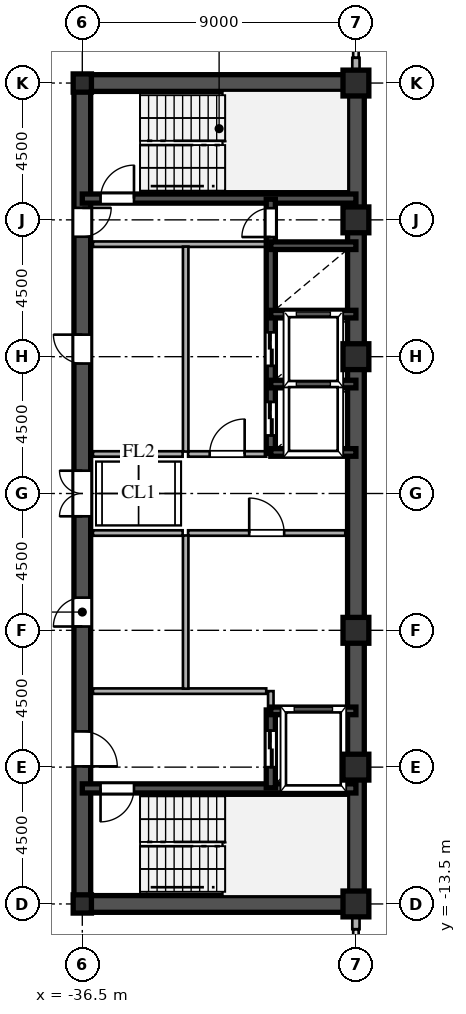
"""IFC4 building model, lengths in metres.
Left out: names, types, materials, properties, quantities, classifications, styles, units other than length and angle.
Written with IfcOpenShell. Run it as: python <this file> out.ifc"""

import sys

from ifc_helpers import new_model, si_unit, direction, frame, frame_2d, origin, origin_2d, place, context, subcontext, project, spatial, rectangle, hollow_rectangle, i_section, extrude, source, transform, mapped, element, fill, save


model = new_model("IFC4")
c1 = context("Model", 3, precision=1e-05, world=origin(), true_north=direction((0.0, 1.0)))
c2 = subcontext(c1, "Body", "Model", "MODEL_VIEW")
j1 = project(units=[si_unit("LENGTHUNIT", "METRE"), si_unit("PLANEANGLEUNIT", "RADIAN")], contexts=[c1])
p1 = place(None, origin())
s1 = spatial("IfcSite", under=j1, at=p1, CompositionType="ELEMENT")
p2 = place(p1, origin())
s2 = spatial("IfcBuilding", under=s1, at=p2, CompositionType="ELEMENT")
p3 = place(p2, frame((0.0, 0.0, 170.7)))
s3 = spatial("IfcBuildingStorey", under=s2, at=p3, CompositionType="ELEMENT", Elevation=170.7)
m1 = source(origin(), c2, "Body", "SweptSolid", [
    extrude(hollow_rectangle(XDim=0.85, YDim=0.85, WallThickness=0.036, at=origin_2d()), origin(), (0.0, 0.0, 1.0), 3.6),
])
for number, where, z_axis, x_axis in (
    (1, (-27.5, -13.5, 0.0), (0.0, 0.0, 1.0), (1.0, 0.0, 0.0)),
    (2, (-27.5, -9.0, 0.0), (0.0, 0.0, 1.0), (1.0, 0.0, 0.0)),
    (3, (-27.5, -4.5, 0.0), (0.0, 0.0, 1.0), (1.0, 0.0, 0.0)),
    (4, (-27.5, 4.5, 0.0), (0.0, 0.0, 1.0), (1.0, 0.0, 0.0)),
    (5, (-27.5, 9.0, 0.0), (0.0, 0.0, 1.0), (1.0, 0.0, 0.0)),
    (6, (-27.5, 13.5, 0.0), (0.0, 0.0, 1.0), (1.0, 0.0, 0.0)),
):
    element("IfcColumn", number, at=place(p3, frame(where, z_axis=z_axis, x_axis=x_axis)), inside=s3, PredefinedType="COLUMN", context=c2, shape_type="MappedRepresentation", body=[
        mapped(m1, transform((0.0, 0.0, 0.0), scale=1.0)),
    ])
m2 = source(origin(), c2, "Body", "SweptSolid", [
    extrude(i_section(OverallWidth=0.6, OverallDepth=0.6, WebThickness=0.025, FlangeThickness=0.04, at=origin_2d()), origin(), (0.0, 0.0, 1.0), 3.6),
])
for number, where, z_axis, x_axis in (
    (7, (-36.5, -13.5, 0.0), (0.0, 0.0, 1.0), (1.0, 0.0, 0.0)),
    (8, (-36.5, 13.5, 0.0), (0.0, 0.0, 1.0), (1.0, 0.0, 0.0)),
):
    element("IfcColumn", number, at=place(p3, frame(where, z_axis=z_axis, x_axis=x_axis)), inside=s3, PredefinedType="COLUMN", context=c2, shape_type="MappedRepresentation", body=[
        mapped(m2, transform((0.0, 0.0, 0.0), scale=1.0)),
    ])
for number, where, z_axis, x_axis in (
    (9, (-27.5, -14.33, 0.0), (0.0, 0.0, 1.0), (0.0, 1.0, 0.0)),
    (10, (-27.5, 13.78, 0.0), (0.0, 0.0, 1.0), (0.0, 1.0, 0.0)),
):
    element("IfcWall", number, at=place(p3, frame(where, z_axis=z_axis, x_axis=x_axis)), inside=s3, PredefinedType="SOLIDWALL", context=c2, shape_type="SweptSolid", body=[
        extrude(rectangle(XDim=0.55, YDim=0.24, at=frame_2d((0.275, 0.0))), origin(), (0.0, 0.0, 1.0), 2.88),
    ])
for number, where, z_axis, x_axis in (
    (11, (-27.5, -13.5, 0.0), (0.0, 0.0, 1.0), (0.0, 1.0, 0.0)),
    (12, (-27.5, 1.3, 0.0), (0.0, 0.0, 1.0), (0.0, 1.0, 0.0)),
):
    element("IfcWall", number, at=place(p3, frame(where, z_axis=z_axis, x_axis=x_axis)), inside=s3, PredefinedType="SHEAR", context=c2, shape_type="SweptSolid", body=[
        extrude(rectangle(XDim=12.2, YDim=0.55, at=frame_2d((6.1, 0.0))), origin(), (0.0, 0.0, 1.0), 3.38),
    ])
p4 = place(p3, frame((-27.5, -1.3, 0.0), z_axis=(0.0, 0.0, 1.0), x_axis=(0.0, 1.0, 0.0)))
e13 = element("IfcWall", 13, at=p4, inside=s3, PredefinedType="SHEAR", context=c2, shape_type="SweptSolid", body=[
    extrude(rectangle(XDim=2.6, YDim=0.55, at=frame_2d((1.3, 0.0))), origin(), (0.0, 0.0, 1.0), 3.38),
])
for number, where, z_axis, x_axis in (
    (14, (-36.5, -13.5, 0.0), (0.0, 0.0, 1.0), (1.0, 0.0, 0.0)),
    (15, (-36.5, 13.5, 0.0), (0.0, 0.0, 1.0), (1.0, 0.0, 0.0)),
):
    element("IfcWall", number, at=place(p3, frame(where, z_axis=z_axis, x_axis=x_axis)), inside=s3, PredefinedType="SHEAR", context=c2, shape_type="SweptSolid", body=[
        extrude(rectangle(XDim=9.0, YDim=0.55, at=frame_2d((4.5, 0.0))), origin(), (0.0, 0.0, 1.0), 3.38),
    ])
p5 = place(p3, frame((-36.5, -13.65, 0.0), z_axis=(0.0, 0.0, 1.0), x_axis=(0.0, 1.0, 0.0)))
e16 = element("IfcWall", 16, at=p5, inside=s3, PredefinedType="SHEAR", context=c2, shape_type="SweptSolid", body=[
    extrude(rectangle(XDim=7.15, YDim=0.55, at=frame_2d((3.575, 0.0))), origin(), (0.0, 0.0, 1.0), 3.38),
])
p6 = place(p5, frame((4.675, 0.0, 0.0)))
e17 = element("IfcOpeningElement", 17, at=p6, cuts=e16, PredefinedType="OPENING", context=c2, shape_type="SweptSolid", body=[
    extrude(rectangle(XDim=1.15, YDim=2.2, at=frame_2d((0.575, 1.1))), frame((0.0, 0.285, 0.0), z_axis=(0.0, -1.0, 0.0), x_axis=(1.0, 0.0, 0.0)), (0.0, 0.0, 1.0), 0.57),
])
p7 = place(p3, frame((-36.5, -1.3, 0.0), z_axis=(0.0, 0.0, 1.0), x_axis=(0.0, 1.0, 0.0)))
e18 = element("IfcWall", 18, at=p7, inside=s3, PredefinedType="SHEAR", context=c2, shape_type="SweptSolid", body=[
    extrude(rectangle(XDim=2.6, YDim=0.55, at=frame_2d((1.3, 0.0))), origin(), (0.0, 0.0, 1.0), 3.38),
])
p8 = place(p7, frame((0.55, 0.0, 0.0)))
e19 = element("IfcOpeningElement", 19, at=p8, cuts=e18, PredefinedType="OPENING", context=c2, shape_type="SweptSolid", body=[
    extrude(rectangle(XDim=1.5, YDim=2.3, at=frame_2d((0.75, 1.15))), frame((0.0, 0.285, 0.0), z_axis=(0.0, -1.0, 0.0), x_axis=(1.0, 0.0, 0.0)), (0.0, 0.0, 1.0), 0.57),
])
p9 = place(p3, frame((-36.5, 8.2, 0.0), z_axis=(0.0, 0.0, 1.0), x_axis=(0.0, 1.0, 0.0)))
e20 = element("IfcWall", 20, at=p9, inside=s3, PredefinedType="SHEAR", context=c2, shape_type="SweptSolid", body=[
    extrude(rectangle(XDim=5.45, YDim=0.55, at=frame_2d((2.725, 0.0))), origin(), (0.0, 0.0, 1.0), 3.38),
])
p10 = place(p9, frame((0.245, 0.0, 0.0)))
e21 = element("IfcOpeningElement", 21, at=p10, cuts=e20, PredefinedType="OPENING", context=c2, shape_type="SweptSolid", body=[
    extrude(rectangle(XDim=0.95, YDim=2.15, at=frame_2d((0.475, 1.075))), frame((0.0, 0.285, 0.0), z_axis=(0.0, -1.0, 0.0), x_axis=(1.0, 0.0, 0.0)), (0.0, 0.0, 1.0), 0.57),
])
p11 = place(p3, frame((-36.5, -6.5, 0.0), z_axis=(0.0, 0.0, 1.0), x_axis=(0.0, 1.0, 0.0)))
e22 = element("IfcWall", 22, at=p11, inside=s3, PredefinedType="SHEAR", context=c2, shape_type="SweptSolid", body=[
    extrude(rectangle(XDim=5.2, YDim=0.55, at=frame_2d((2.6, 0.0))), origin(), (0.0, 0.0, 1.0), 3.38),
])
p12 = place(p11, frame((2.125, 0.0, 0.0)))
e23 = element("IfcOpeningElement", 23, at=p12, cuts=e22, PredefinedType="OPENING", context=c2, shape_type="SweptSolid", body=[
    extrude(rectangle(XDim=0.95, YDim=2.15, at=frame_2d((0.475, 1.075))), frame((0.0, 0.285, 0.0), z_axis=(0.0, -1.0, 0.0), x_axis=(1.0, 0.0, 0.0)), (0.0, 0.0, 1.0), 0.57),
])
p13 = place(p3, frame((-36.5, 1.3, 0.0), z_axis=(0.0, 0.0, 1.0), x_axis=(0.0, 1.0, 0.0)))
e24 = element("IfcWall", 24, at=p13, inside=s3, PredefinedType="SHEAR", context=c2, shape_type="SweptSolid", body=[
    extrude(rectangle(XDim=6.9, YDim=0.55, at=frame_2d((3.45, 0.0))), origin(), (0.0, 0.0, 1.0), 3.38),
])
p14 = place(p13, frame((2.975, 0.0, 0.0)))
e25 = element("IfcOpeningElement", 25, at=p14, cuts=e24, PredefinedType="OPENING", context=c2, shape_type="SweptSolid", body=[
    extrude(rectangle(XDim=0.95, YDim=2.15, at=frame_2d((0.475, 1.075))), frame((0.0, 0.285, 0.0), z_axis=(0.0, -1.0, 0.0), x_axis=(1.0, 0.0, 0.0)), (0.0, 0.0, 1.0), 0.57),
])
p15 = place(p3, frame((-36.5, -9.7, 0.0), z_axis=(0.0, 0.0, 1.0), x_axis=(1.0, 0.0, 0.0)))
e26 = element("IfcWall", 26, at=p15, inside=s3, PredefinedType="SHEAR", context=c2, shape_type="SweptSolid", body=[
    extrude(rectangle(XDim=9.0, YDim=0.3, at=frame_2d((4.5, 0.0))), origin(), (0.0, 0.0, 1.0), 3.38),
])
p16 = place(p15, frame((0.6, 0.0, 0.0)))
e27 = element("IfcOpeningElement", 27, at=p16, cuts=e26, PredefinedType="OPENING", context=c2, shape_type="SweptSolid", body=[
    extrude(rectangle(XDim=1.1, YDim=2.2, at=frame_2d((0.55, 1.1))), frame((0.0, 0.16, 0.0), z_axis=(0.0, -1.0, 0.0), x_axis=(1.0, 0.0, 0.0)), (0.0, 0.0, 1.0), 0.32),
])
p17 = place(p3, frame((-36.5, 9.7, 0.0), z_axis=(0.0, 0.0, 1.0), x_axis=(1.0, 0.0, 0.0)))
e28 = element("IfcWall", 28, at=p17, inside=s3, PredefinedType="SHEAR", context=c2, shape_type="SweptSolid", body=[
    extrude(rectangle(XDim=9.0, YDim=0.3, at=frame_2d((4.5, 0.0))), origin(), (0.0, 0.0, 1.0), 3.38),
])
p18 = place(p17, frame((0.6, 0.0, 0.0)))
e29 = element("IfcOpeningElement", 29, at=p18, cuts=e28, PredefinedType="OPENING", context=c2, shape_type="SweptSolid", body=[
    extrude(rectangle(XDim=1.1, YDim=2.2, at=frame_2d((0.55, 1.1))), frame((0.0, 0.16, 0.0), z_axis=(0.0, -1.0, 0.0), x_axis=(1.0, 0.0, 0.0)), (0.0, 0.0, 1.0), 0.32),
])
for number, where, z_axis, x_axis in (
    (30, (-30.3, -7.15, 0.0), (0.0, 0.0, 1.0), (1.0, 0.0, 0.0)),
    (31, (-30.3, 1.35, 0.0), (0.0, 0.0, 1.0), (1.0, 0.0, 0.0)),
    (32, (-30.3, 3.6, 0.0), (0.0, 0.0, 1.0), (1.0, 0.0, 0.0)),
    (33, (-30.3, 5.9, 0.0), (0.0, 0.0, 1.0), (1.0, 0.0, 0.0)),
    (34, (-30.3, 8.15, 0.0), (0.0, 0.0, 1.0), (1.0, 0.0, 0.0)),
):
    element("IfcWall", number, at=place(p3, frame(where, z_axis=z_axis, x_axis=x_axis)), inside=s3, PredefinedType="SHEAR", context=c2, shape_type="SweptSolid", body=[
        extrude(rectangle(XDim=2.8, YDim=0.25, at=frame_2d((1.4, 0.0))), origin(), (0.0, 0.0, 1.0), 3.38),
    ])
p19 = place(p3, frame((-30.3, -9.68, 0.0), z_axis=(0.0, 0.0, 1.0), x_axis=(0.0, 1.0, 0.0)))
e35 = element("IfcWall", 35, at=p19, inside=s3, PredefinedType="SHEAR", context=c2, shape_type="SweptSolid", body=[
    extrude(rectangle(XDim=2.56, YDim=0.3, at=frame_2d((1.28, 0.0))), origin(), (0.0, 0.0, 1.0), 3.38),
])
p20 = place(p19, frame((0.68, 0.0, 0.0)))
e36 = element("IfcOpeningElement", 36, at=p20, cuts=e35, PredefinedType="OPENING", context=c2, shape_type="SweptSolid", body=[
    extrude(rectangle(XDim=1.2, YDim=2.25, at=frame_2d((0.6, 1.125))), frame((0.0, 0.16, 0.0), z_axis=(0.0, -1.0, 0.0), x_axis=(1.0, 0.0, 0.0)), (0.0, 0.0, 1.0), 0.32),
])
p21 = place(p3, frame((-30.3, 1.32, 0.0), z_axis=(0.0, 0.0, 1.0), x_axis=(0.0, 1.0, 0.0)))
e37 = element("IfcWall", 37, at=p21, inside=s3, PredefinedType="SHEAR", context=c2, shape_type="SweptSolid", body=[
    extrude(rectangle(XDim=2.28, YDim=0.3, at=frame_2d((1.14, 0.0))), origin(), (0.0, 0.0, 1.0), 3.38),
])
p22 = place(p21, frame((0.59, 0.0, 0.0)))
e38 = element("IfcOpeningElement", 38, at=p22, cuts=e37, PredefinedType="OPENING", context=c2, shape_type="SweptSolid", body=[
    extrude(rectangle(XDim=1.1, YDim=2.2, at=frame_2d((0.55, 1.1))), frame((0.0, 0.16, 0.0), z_axis=(0.0, -1.0, 0.0), x_axis=(1.0, 0.0, 0.0)), (0.0, 0.0, 1.0), 0.32),
])
p23 = place(p3, frame((-30.3, 3.6, 0.0), z_axis=(0.0, 0.0, 1.0), x_axis=(0.0, 1.0, 0.0)))
e39 = element("IfcWall", 39, at=p23, inside=s3, PredefinedType="SHEAR", context=c2, shape_type="SweptSolid", body=[
    extrude(rectangle(XDim=2.3, YDim=0.3, at=frame_2d((1.15, 0.0))), origin(), (0.0, 0.0, 1.0), 3.38),
])
p24 = place(p23, frame((0.6, 0.0, 0.0)))
e40 = element("IfcOpeningElement", 40, at=p24, cuts=e39, PredefinedType="OPENING", context=c2, shape_type="SweptSolid", body=[
    extrude(rectangle(XDim=1.1, YDim=2.2, at=frame_2d((0.55, 1.1))), frame((0.0, 0.16, 0.0), z_axis=(0.0, -1.0, 0.0), x_axis=(1.0, 0.0, 0.0)), (0.0, 0.0, 1.0), 0.32),
])
p25 = place(p3, frame((-30.3, 5.9, 0.0), z_axis=(0.0, 0.0, 1.0), x_axis=(0.0, 1.0, 0.0)))
e41 = element("IfcWall", 41, at=p25, inside=s3, PredefinedType="SHEAR", context=c2, shape_type="SweptSolid", body=[
    extrude(rectangle(XDim=2.25, YDim=0.3, at=frame_2d((1.125, 0.0))), origin(), (0.0, 0.0, 1.0), 3.38),
])
p26 = place(p3, frame((-30.3, 8.15, 0.0), z_axis=(0.0, 0.0, 1.0), x_axis=(0.0, 1.0, 0.0)))
e42 = element("IfcWall", 42, at=p26, inside=s3, PredefinedType="SHEAR", context=c2, shape_type="SweptSolid", body=[
    extrude(rectangle(XDim=1.53, YDim=0.3, at=frame_2d((0.765, 0.0))), origin(), (0.0, 0.0, 1.0), 3.38),
])
p27 = place(p26, frame((0.285, 0.0, 0.0)))
e43 = element("IfcOpeningElement", 43, at=p27, cuts=e42, PredefinedType="OPENING", context=c2, shape_type="SweptSolid", body=[
    extrude(rectangle(XDim=0.95, YDim=2.15, at=frame_2d((0.475, 1.075))), frame((0.0, 0.16, 0.0), z_axis=(0.0, -1.0, 0.0), x_axis=(1.0, 0.0, 0.0)), (0.0, 0.0, 1.0), 0.32),
])
p28 = place(p3, frame((-36.15, -6.5, 0.0), z_axis=(0.0, 0.0, 1.0), x_axis=(1.0, 0.0, 0.0)))
e44 = element("IfcWall", 44, at=p28, inside=s3, PredefinedType="PARTITIONING", context=c2, shape_type="SweptSolid", body=[
    extrude(rectangle(XDim=5.7, YDim=0.18, at=frame_2d((2.85, 0.0))), origin(), (0.0, 0.0, 1.0), 3.38),
])
p29 = place(p3, frame((-30.3, -7.12, 0.0), z_axis=(0.0, 0.0, 1.0), x_axis=(0.0, 1.0, 0.0)))
e45 = element("IfcWall", 45, at=p29, inside=s3, PredefinedType="PARTITIONING", context=c2, shape_type="SweptSolid", body=[
    extrude(rectangle(XDim=0.62, YDim=0.18, at=frame_2d((0.31, 0.0))), origin(), (0.0, 0.0, 1.0), 3.38),
])
p30 = place(p3, frame((-36.15, 8.2, 0.0), z_axis=(0.0, 0.0, 1.0), x_axis=(1.0, 0.0, 0.0)))
e46 = element("IfcWall", 46, at=p30, inside=s3, PredefinedType="PARTITIONING", context=c2, shape_type="SweptSolid", body=[
    extrude(rectangle(XDim=5.7, YDim=0.18, at=frame_2d((2.85, 0.0))), origin(), (0.0, 0.0, 1.0), 3.38),
])
p31 = place(p3, frame((-33.1, -6.42, 0.0), z_axis=(0.0, 0.0, 1.0), x_axis=(0.0, 1.0, 0.0)))
e47 = element("IfcWall", 47, at=p31, inside=s3, PredefinedType="PARTITIONING", context=c2, shape_type="SweptSolid", body=[
    extrude(rectangle(XDim=5.04, YDim=0.18, at=frame_2d((2.52, 0.0))), origin(), (0.0, 0.0, 1.0), 3.38),
])
p32 = place(p3, frame((-33.1, 1.38, 0.0), z_axis=(0.0, 0.0, 1.0), x_axis=(0.0, 1.0, 0.0)))
e48 = element("IfcWall", 48, at=p32, inside=s3, PredefinedType="PARTITIONING", context=c2, shape_type="SweptSolid", body=[
    extrude(rectangle(XDim=6.74, YDim=0.18, at=frame_2d((3.37, 0.0))), origin(), (0.0, 0.0, 1.0), 3.38),
])
p33 = place(p3, frame((-33.02, -1.3, 0.0), z_axis=(0.0, 0.0, 1.0), x_axis=(1.0, 0.0, 0.0)))
e49 = element("IfcWall", 49, at=p33, inside=s3, PredefinedType="PARTITIONING", context=c2, shape_type="SweptSolid", body=[
    extrude(rectangle(XDim=5.17, YDim=0.18, at=frame_2d((2.585, 0.0))), origin(), (0.0, 0.0, 1.0), 3.38),
])
p34 = place(p33, frame((2.01, 0.0, 0.0)))
e50 = element("IfcOpeningElement", 50, at=p34, cuts=e49, PredefinedType="OPENING", context=c2, shape_type="SweptSolid", body=[
    extrude(rectangle(XDim=1.15, YDim=2.2, at=frame_2d((0.575, 1.1))), frame((0.0, 0.1, 0.0), z_axis=(0.0, -1.0, 0.0), x_axis=(1.0, 0.0, 0.0)), (0.0, 0.0, 1.0), 0.2),
])
p35 = place(p3, frame((-33.02, 1.3, 0.0), z_axis=(0.0, 0.0, 1.0), x_axis=(1.0, 0.0, 0.0)))
e51 = element("IfcWall", 51, at=p35, inside=s3, PredefinedType="PARTITIONING", context=c2, shape_type="SweptSolid", body=[
    extrude(rectangle(XDim=2.57, YDim=0.18, at=frame_2d((1.285, 0.0))), origin(), (0.0, 0.0, 1.0), 3.38),
])
p36 = place(p35, frame((0.71, 0.0, 0.0)))
e52 = element("IfcOpeningElement", 52, at=p36, cuts=e51, PredefinedType="OPENING", context=c2, shape_type="SweptSolid", body=[
    extrude(rectangle(XDim=1.15, YDim=2.2, at=frame_2d((0.575, 1.1))), frame((0.0, 0.1, 0.0), z_axis=(0.0, -1.0, 0.0), x_axis=(1.0, 0.0, 0.0)), (0.0, 0.0, 1.0), 0.2),
])
for number, where, z_axis, x_axis in (
    (53, (-36.15, -1.3, 0.0), (0.0, 0.0, 1.0), (1.0, 0.0, 0.0)),
    (54, (-36.15, 1.3, 0.0), (0.0, 0.0, 1.0), (1.0, 0.0, 0.0)),
):
    element("IfcWall", number, at=place(p3, frame(where, z_axis=z_axis, x_axis=x_axis)), inside=s3, PredefinedType="PARTITIONING", context=c2, shape_type="SweptSolid", body=[
        extrude(rectangle(XDim=2.95, YDim=0.18, at=frame_2d((1.475, 0.0))), origin(), (0.0, 0.0, 1.0), 3.38),
    ])
m3 = source(origin(), c2, "Body", "SweptSolid", [
    extrude(rectangle(XDim=1.15, YDim=2.2, at=frame_2d((0.575, 1.1))), frame((0.0, 0.025, 0.0), z_axis=(0.0, -1.0, 0.0), x_axis=(1.0, 0.0, 0.0)), (0.0, 0.0, 1.0), 0.05),
])
p37 = place(p6, frame((1.15, 0.0, 0.0), z_axis=(0.0, 0.0, 1.0), x_axis=(-1.0, 0.0, 0.0)))
e55 = element("IfcDoor", 55, at=p37, inside=s3, OperationType="SINGLE_SWING_LEFT", PredefinedType="DOOR", context=c2, shape_type="MappedRepresentation", body=[
    mapped(m3, transform((0.0, 0.0, 0.0), scale=1.0)),
])
fill(e17, e55)
m4 = source(origin(), c2, "Body", "SweptSolid", [
    extrude(rectangle(XDim=1.5, YDim=2.3, at=frame_2d((0.75, 1.15))), frame((0.0, 0.025, 0.0), z_axis=(0.0, -1.0, 0.0), x_axis=(1.0, 0.0, 0.0)), (0.0, 0.0, 1.0), 0.05),
])
p38 = place(p8, origin())
e56 = element("IfcDoor", 56, at=p38, inside=s3, OperationType="DOUBLE_SWING_LEFT", PredefinedType="DOOR", context=c2, shape_type="MappedRepresentation", body=[
    mapped(m4, transform((0.0, 0.0, 0.0), scale=1.0)),
])
fill(e19, e56)
m5 = source(origin(), c2, "Body", "SweptSolid", [
    extrude(rectangle(XDim=0.95, YDim=2.15, at=frame_2d((0.475, 1.075))), frame((0.0, 0.025, 0.0), z_axis=(0.0, -1.0, 0.0), x_axis=(1.0, 0.0, 0.0)), (0.0, 0.0, 1.0), 0.05),
])
p39 = place(p10, frame((0.95, 0.0, 0.0), z_axis=(0.0, 0.0, 1.0), x_axis=(-1.0, 0.0, 0.0)))
e57 = element("IfcDoor", 57, at=p39, inside=s3, OperationType="SINGLE_SWING_RIGHT", PredefinedType="DOOR", context=c2, shape_type="MappedRepresentation", body=[
    mapped(m5, transform((0.0, 0.0, 0.0), scale=1.0)),
])
fill(e21, e57)
p40 = place(p12, origin())
e58 = element("IfcDoor", 58, at=p40, inside=s3, OperationType="SINGLE_SWING_LEFT", PredefinedType="DOOR", context=c2, shape_type="MappedRepresentation", body=[
    mapped(m5, transform((0.0, 0.0, 0.0), scale=1.0)),
])
fill(e23, e58)
p41 = place(p14, origin())
e59 = element("IfcDoor", 59, at=p41, inside=s3, OperationType="SINGLE_SWING_RIGHT", PredefinedType="DOOR", context=c2, shape_type="MappedRepresentation", body=[
    mapped(m5, transform((0.0, 0.0, 0.0), scale=1.0)),
])
fill(e25, e59)
m6 = source(origin(), c2, "Body", "SweptSolid", [
    extrude(rectangle(XDim=1.1, YDim=2.2, at=frame_2d((0.55, 1.1))), frame((0.0, 0.025, 0.0), z_axis=(0.0, -1.0, 0.0), x_axis=(1.0, 0.0, 0.0)), (0.0, 0.0, 1.0), 0.05),
])
p42 = place(p16, frame((1.1, 0.0, 0.0), z_axis=(0.0, 0.0, 1.0), x_axis=(-1.0, 0.0, 0.0)))
e60 = element("IfcDoor", 60, at=p42, inside=s3, OperationType="SINGLE_SWING_LEFT", PredefinedType="DOOR", context=c2, shape_type="MappedRepresentation", body=[
    mapped(m6, transform((0.0, 0.0, 0.0), scale=1.0)),
])
fill(e27, e60)
p43 = place(p18, origin())
e61 = element("IfcDoor", 61, at=p43, inside=s3, OperationType="SINGLE_SWING_RIGHT", PredefinedType="DOOR", context=c2, shape_type="MappedRepresentation", body=[
    mapped(m6, transform((0.0, 0.0, 0.0), scale=1.0)),
])
fill(e29, e61)
m7 = source(origin(), c2, "Body", "SweptSolid", [
    extrude(rectangle(XDim=1.2, YDim=2.25, at=frame_2d((0.6, 1.125))), frame((0.0, 0.025, 0.0), z_axis=(0.0, -1.0, 0.0), x_axis=(1.0, 0.0, 0.0)), (0.0, 0.0, 1.0), 0.05),
])
p44 = place(p20, origin())
e62 = element("IfcDoor", 62, at=p44, inside=s3, OperationType="DOUBLE_DOOR_SLIDING", PredefinedType="DOOR", context=c2, shape_type="MappedRepresentation", body=[
    mapped(m7, transform((0.0, 0.0, 0.0), scale=1.0)),
])
fill(e36, e62)
m8 = source(origin(), c2, "Body", "SweptSolid", [
    extrude(rectangle(XDim=1.1, YDim=2.2, at=frame_2d((0.55, 1.1))), frame((0.0, 0.025, 0.0), z_axis=(0.0, -1.0, 0.0), x_axis=(1.0, 0.0, 0.0)), (0.0, 0.0, 1.0), 0.05),
])
p45 = place(p22, origin())
e63 = element("IfcDoor", 63, at=p45, inside=s3, OperationType="DOUBLE_DOOR_SLIDING", PredefinedType="DOOR", context=c2, shape_type="MappedRepresentation", body=[
    mapped(m8, transform((0.0, 0.0, 0.0), scale=1.0)),
])
fill(e38, e63)
p46 = place(p24, origin())
e64 = element("IfcDoor", 64, at=p46, inside=s3, OperationType="DOUBLE_DOOR_SLIDING", PredefinedType="DOOR", context=c2, shape_type="MappedRepresentation", body=[
    mapped(m8, transform((0.0, 0.0, 0.0), scale=1.0)),
])
fill(e40, e64)
p47 = place(p27, origin())
e65 = element("IfcDoor", 65, at=p47, inside=s3, OperationType="SINGLE_SWING_LEFT", PredefinedType="DOOR", context=c2, shape_type="MappedRepresentation", body=[
    mapped(m5, transform((0.0, 0.0, 0.0), scale=1.0)),
])
fill(e43, e65)
p48 = place(p34, origin())
e66 = element("IfcDoor", 66, at=p48, inside=s3, OperationType="SINGLE_SWING_LEFT", PredefinedType="DOOR", context=c2, shape_type="MappedRepresentation", body=[
    mapped(m3, transform((0.0, 0.0, 0.0), scale=1.0)),
])
fill(e50, e66)
p49 = place(p36, origin())
e67 = element("IfcDoor", 67, at=p49, inside=s3, OperationType="SINGLE_SWING_RIGHT", PredefinedType="DOOR", context=c2, shape_type="MappedRepresentation", body=[
    mapped(m3, transform((0.0, 0.0, 0.0), scale=1.0)),
])
fill(e52, e67)
save(model, sys.argv[1])
